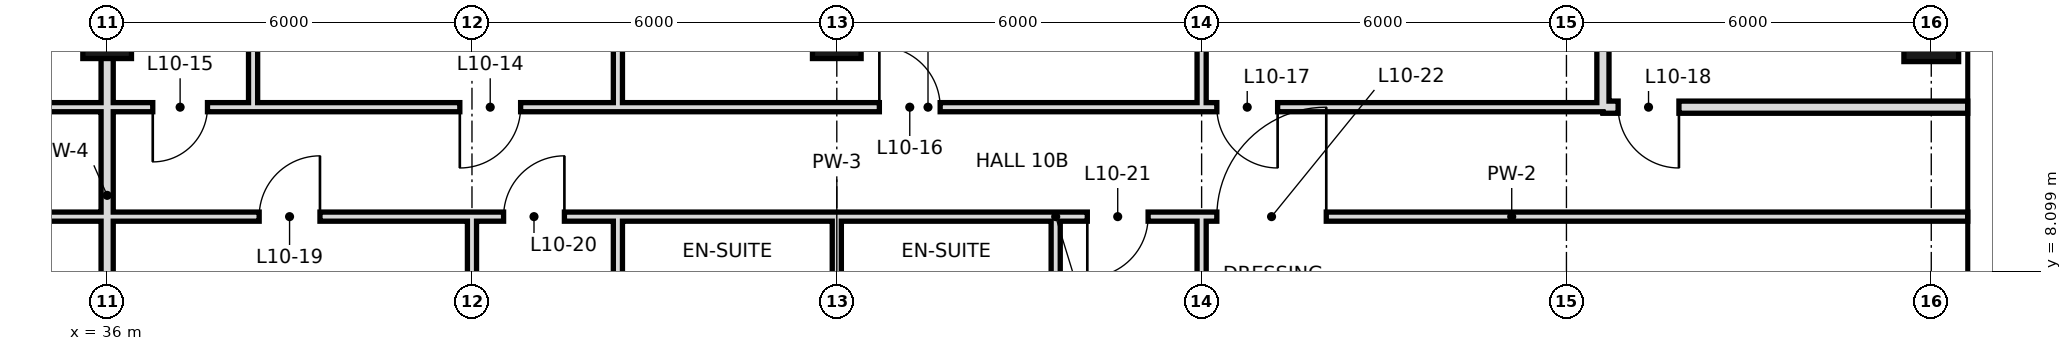
"""IFC4 building model, lengths in metres.
Left out: names, types, materials, properties, quantities, classifications, styles, units other than length and angle.
Written with IfcOpenShell. Run it as: python <this file> out.ifc"""

import sys

from ifc_helpers import new_model, si_unit, direction, frame, frame_2d, origin, origin_2d, place, context, subcontext, project, spatial, rectangle, hollow_rectangle, extrude, element, fill, save


model = new_model("IFC4")
c1 = context("Model", 3, precision=1e-05, world=origin(), true_north=direction((0.0, 1.0)))
c2 = subcontext(c1, "Body", "Model", "MODEL_VIEW")
j1 = project(units=[si_unit("LENGTHUNIT", "METRE"), si_unit("PLANEANGLEUNIT", "RADIAN")], contexts=[c1])
p1 = place(None, origin())
s1 = spatial("IfcSite", under=j1, at=p1, CompositionType="ELEMENT")
p2 = place(p1, origin())
s2 = spatial("IfcBuilding", under=s1, at=p2, CompositionType="ELEMENT")
p3 = place(p2, frame((0.0, 0.0, 57.0)))
s3 = spatial("IfcBuildingStorey", under=s2, at=p3, CompositionType="ELEMENT", Elevation=57.0)
for number, where, z_axis, x_axis in (
    (1, (36.0, 12.0, 0.0), (0.0, 0.0, 1.0), (1.0, 0.0, 0.0)),
    (2, (48.0, 12.0, 0.0), (0.0, 0.0, 1.0), (1.0, 0.0, 0.0)),
):
    element("IfcColumn", number, at=place(p3, frame(where, z_axis=z_axis, x_axis=x_axis)), inside=s3, PredefinedType="COLUMN", context=c2, shape_type="SweptSolid", body=[
        extrude(hollow_rectangle(XDim=0.8, YDim=0.8, WallThickness=0.04, at=origin_2d()), origin(), (0.0, 0.0, 1.0), 3.6),
    ])
p4 = place(p3, frame((66.0, 12.0, 0.0), z_axis=(0.0, 0.0, 1.0), x_axis=(1.0, 0.0, 0.0)))
e3 = element("IfcColumn", 3, at=p4, inside=s3, PredefinedType="COLUMN", context=c2, shape_type="SweptSolid", body=[
    extrude(hollow_rectangle(XDim=0.9, YDim=0.9, WallThickness=0.045, at=origin_2d()), origin(), (0.0, 0.0, 1.0), 3.6),
])
p5 = place(p3, frame((36.0, 0.0, 0.0), z_axis=(0.0, 0.0, 1.0), x_axis=(0.0, 1.0, 0.0)))
e4 = element("IfcWall", 4, at=p5, inside=s3, PredefinedType="SOLIDWALL", context=c2, shape_type="SweptSolid", body=[
    extrude(rectangle(XDim=18.7, YDim=0.2, at=frame_2d((9.35, 0.0))), origin(), (0.0, 0.0, 1.0), 2.72),
])
p6 = place(p3, frame((38.4, 10.8, 0.0), z_axis=(0.0, 0.0, 1.0), x_axis=(0.0, 1.0, 0.0)))
e5 = element("IfcWall", 5, at=p6, inside=s3, PredefinedType="PARTITIONING", context=c2, shape_type="SweptSolid", body=[
    extrude(rectangle(XDim=7.9, YDim=0.15, at=frame_2d((3.95, 0.0))), origin(), (0.0, 0.0, 1.0), 3.42),
])
p7 = place(p3, frame((42.0, -0.6, 0.0), z_axis=(0.0, 0.0, 1.0), x_axis=(0.0, 1.0, 0.0)))
e6 = element("IfcWall", 6, at=p7, inside=s3, PredefinedType="PARTITIONING", context=c2, shape_type="SweptSolid", body=[
    extrude(rectangle(XDim=9.6, YDim=0.15, at=frame_2d((4.8, 0.0))), origin(), (0.0, 0.0, 1.0), 2.72),
])
p8 = place(p3, frame((44.4, 10.8, 0.0), z_axis=(0.0, 0.0, 1.0), x_axis=(0.0, 1.0, 0.0)))
e7 = element("IfcWall", 7, at=p8, inside=s3, PredefinedType="PARTITIONING", context=c2, shape_type="SweptSolid", body=[
    extrude(rectangle(XDim=7.9, YDim=0.15, at=frame_2d((3.95, 0.0))), origin(), (0.0, 0.0, 1.0), 3.42),
])
p9 = place(p3, frame((44.4, 6.0, 0.0), z_axis=(0.0, 0.0, 1.0), x_axis=(0.0, 1.0, 0.0)))
e8 = element("IfcWall", 8, at=p9, inside=s3, PredefinedType="PARTITIONING", context=c2, shape_type="SweptSolid", body=[
    extrude(rectangle(XDim=3.0, YDim=0.15, at=frame_2d((1.5, 0.0))), origin(), (0.0, 0.0, 1.0), 3.42),
])
p10 = place(p3, frame((48.0, 6.0, 0.0), z_axis=(0.0, 0.0, 1.0), x_axis=(0.0, 1.0, 0.0)))
e9 = element("IfcWall", 9, at=p10, inside=s3, PredefinedType="PARTITIONING", context=c2, shape_type="SweptSolid", body=[
    extrude(rectangle(XDim=3.0, YDim=0.15, at=frame_2d((1.5, 0.0))), origin(), (0.0, 0.0, 1.0), 2.72),
])
p11 = place(p3, frame((51.6, 6.0, 0.0), z_axis=(0.0, 0.0, 1.0), x_axis=(0.0, 1.0, 0.0)))
e10 = element("IfcWall", 10, at=p11, inside=s3, PredefinedType="PARTITIONING", context=c2, shape_type="SweptSolid", body=[
    extrude(rectangle(XDim=3.0, YDim=0.15, at=frame_2d((1.5, 0.0))), origin(), (0.0, 0.0, 1.0), 3.42),
])
p12 = place(p3, frame((54.0, -0.6, 0.0), z_axis=(0.0, 0.0, 1.0), x_axis=(0.0, 1.0, 0.0)))
e11 = element("IfcWall", 11, at=p12, inside=s3, PredefinedType="PARTITIONING", context=c2, shape_type="SweptSolid", body=[
    extrude(rectangle(XDim=9.6, YDim=0.15, at=frame_2d((4.8, 0.0))), origin(), (0.0, 0.0, 1.0), 3.42),
])
p13 = place(p3, frame((54.0, 10.8, 0.0), z_axis=(0.0, 0.0, 1.0), x_axis=(0.0, 1.0, 0.0)))
e12 = element("IfcWall", 12, at=p13, inside=s3, PredefinedType="PARTITIONING", context=c2, shape_type="SweptSolid", body=[
    extrude(rectangle(XDim=7.2, YDim=0.15, at=frame_2d((3.6, 0.0))), origin(), (0.0, 0.0, 1.0), 3.42),
])
p14 = place(p3, frame((60.6, 10.8, 0.0), z_axis=(0.0, 0.0, 1.0), x_axis=(0.0, 1.0, 0.0)))
e13 = element("IfcWall", 13, at=p14, inside=s3, PredefinedType="SOLIDWALL", context=c2, shape_type="SweptSolid", body=[
    extrude(rectangle(XDim=7.2, YDim=0.2, at=frame_2d((3.6, 0.0))), origin(), (0.0, 0.0, 1.0), 2.52),
])
p15 = place(p3, frame((60.6, 10.8, 0.0), z_axis=(0.0, 0.0, 1.0), x_axis=(1.0, 0.0, 0.0)))
e14 = element("IfcWall", 14, at=p15, inside=s3, PredefinedType="SOLIDWALL", context=c2, shape_type="SweptSolid", body=[
    extrude(rectangle(XDim=6.0, YDim=0.2, at=frame_2d((3.0, 0.0))), origin(), (0.0, 0.0, 1.0), 2.97),
])
p16 = place(p15, frame((0.25, 0.0, 0.0)))
e15 = element("IfcOpeningElement", 15, at=p16, cuts=e14, PredefinedType="OPENING", context=c2, shape_type="SweptSolid", body=[
    extrude(rectangle(XDim=1.0, YDim=2.4, at=frame_2d((0.5, 1.2))), frame((0.0, 0.11, 0.0), z_axis=(0.0, -1.0, 0.0), x_axis=(1.0, 0.0, 0.0)), (0.0, 0.0, 1.0), 0.22),
])
p17 = place(p3, frame((6.6, 10.8, 0.0), z_axis=(0.0, 0.0, 1.0), x_axis=(1.0, 0.0, 0.0)))
e16 = element("IfcWall", 16, at=p17, inside=s3, PredefinedType="PARTITIONING", context=c2, shape_type="SweptSolid", body=[
    extrude(rectangle(XDim=29.4, YDim=0.15, at=frame_2d((14.7, 0.0))), origin(), (0.0, 0.0, 1.0), 3.42),
])
p18 = place(p17, frame((26.8, 0.0, 0.0)))
e17 = element("IfcOpeningElement", 17, at=p18, cuts=e16, PredefinedType="OPENING", context=c2, shape_type="SweptSolid", body=[
    extrude(rectangle(XDim=1.0, YDim=2.4, at=frame_2d((0.5, 1.2))), frame((0.0, 0.085, 0.0), z_axis=(0.0, -1.0, 0.0), x_axis=(1.0, 0.0, 0.0)), (0.0, 0.0, 1.0), 0.17),
])
p19 = place(p17, frame((3.22, 0.0, 0.0)))
e18 = element("IfcOpeningElement", 18, at=p19, cuts=e16, PredefinedType="OPENING", context=c2, shape_type="SweptSolid", body=[
    extrude(rectangle(XDim=1.0, YDim=2.4, at=frame_2d((0.5, 1.2))), frame((0.0, 0.085, 0.0), z_axis=(0.0, -1.0, 0.0), x_axis=(1.0, 0.0, 0.0)), (0.0, 0.0, 1.0), 0.17),
])
p20 = place(p17, frame((14.8, 0.0, 0.0)))
e19 = element("IfcOpeningElement", 19, at=p20, cuts=e16, PredefinedType="OPENING", context=c2, shape_type="SweptSolid", body=[
    extrude(rectangle(XDim=1.0, YDim=2.4, at=frame_2d((0.5, 1.2))), frame((0.0, 0.085, 0.0), z_axis=(0.0, -1.0, 0.0), x_axis=(1.0, 0.0, 0.0)), (0.0, 0.0, 1.0), 0.17),
])
p21 = place(p3, frame((38.4, 10.8, 0.0), z_axis=(0.0, 0.0, 1.0), x_axis=(1.0, 0.0, 0.0)))
e20 = element("IfcWall", 20, at=p21, inside=s3, PredefinedType="PARTITIONING", context=c2, shape_type="SweptSolid", body=[
    extrude(rectangle(XDim=22.2, YDim=0.15, at=frame_2d((11.1, 0.0))), origin(), (0.0, 0.0, 1.0), 3.42),
])
p22 = place(p21, frame((3.4, 0.0, 0.0)))
e21 = element("IfcOpeningElement", 21, at=p22, cuts=e20, PredefinedType="OPENING", context=c2, shape_type="SweptSolid", body=[
    extrude(rectangle(XDim=1.0, YDim=2.4, at=frame_2d((0.5, 1.2))), frame((0.0, 0.085, 0.0), z_axis=(0.0, -1.0, 0.0), x_axis=(1.0, 0.0, 0.0)), (0.0, 0.0, 1.0), 0.17),
])
p23 = place(p21, frame((10.3, 0.0, 0.0)))
e22 = element("IfcOpeningElement", 22, at=p23, cuts=e20, PredefinedType="OPENING", context=c2, shape_type="SweptSolid", body=[
    extrude(rectangle(XDim=1.0, YDim=2.4, at=frame_2d((0.5, 1.2))), frame((0.0, 0.085, 0.0), z_axis=(0.0, -1.0, 0.0), x_axis=(1.0, 0.0, 0.0)), (0.0, 0.0, 1.0), 0.17),
])
p24 = place(p21, frame((15.85, 0.0, 0.0)))
e23 = element("IfcOpeningElement", 23, at=p24, cuts=e20, PredefinedType="OPENING", context=c2, shape_type="SweptSolid", body=[
    extrude(rectangle(XDim=1.0, YDim=2.4, at=frame_2d((0.5, 1.2))), frame((0.0, 0.085, 0.0), z_axis=(0.0, -1.0, 0.0), x_axis=(1.0, 0.0, 0.0)), (0.0, 0.0, 1.0), 0.17),
])
p25 = place(p3, frame((36.0, 10.8, 0.0), z_axis=(0.0, 0.0, 1.0), x_axis=(1.0, 0.0, 0.0)))
e24 = element("IfcWall", 24, at=p25, inside=s3, PredefinedType="PARTITIONING", context=c2, shape_type="SweptSolid", body=[
    extrude(rectangle(XDim=2.4, YDim=0.15, at=frame_2d((1.2, 0.0))), origin(), (0.0, 0.0, 1.0), 3.42),
])
p26 = place(p25, frame((0.75, 0.0, 0.0)))
e25 = element("IfcOpeningElement", 25, at=p26, cuts=e24, PredefinedType="OPENING", context=c2, shape_type="SweptSolid", body=[
    extrude(rectangle(XDim=0.9, YDim=2.4, at=frame_2d((0.45, 1.2))), frame((0.0, 0.085, 0.0), z_axis=(0.0, -1.0, 0.0), x_axis=(1.0, 0.0, 0.0)), (0.0, 0.0, 1.0), 0.17),
])
p27 = place(p3, frame((8.4, 9.0, 0.0), z_axis=(0.0, 0.0, 1.0), x_axis=(1.0, 0.0, 0.0)))
e26 = element("IfcWall", 26, at=p27, inside=s3, PredefinedType="PARTITIONING", context=c2, shape_type="SweptSolid", body=[
    extrude(rectangle(XDim=36.0, YDim=0.15, at=frame_2d((18.0, 0.0))), origin(), (0.0, 0.0, 1.0), 3.42),
])
p28 = place(p27, frame((0.88, 0.0, 0.0)))
e27 = element("IfcOpeningElement", 27, at=p28, cuts=e26, PredefinedType="OPENING", context=c2, shape_type="SweptSolid", body=[
    extrude(rectangle(XDim=1.0, YDim=2.4, at=frame_2d((0.5, 1.2))), frame((0.0, 0.085, 0.0), z_axis=(0.0, -1.0, 0.0), x_axis=(1.0, 0.0, 0.0)), (0.0, 0.0, 1.0), 0.17),
])
p29 = place(p27, frame((6.1, 0.0, 0.0)))
e28 = element("IfcOpeningElement", 28, at=p29, cuts=e26, PredefinedType="OPENING", context=c2, shape_type="SweptSolid", body=[
    extrude(rectangle(XDim=1.0, YDim=2.4, at=frame_2d((0.5, 1.2))), frame((0.0, 0.085, 0.0), z_axis=(0.0, -1.0, 0.0), x_axis=(1.0, 0.0, 0.0)), (0.0, 0.0, 1.0), 0.17),
])
p30 = place(p27, frame((16.64, 0.0, 0.0)))
e29 = element("IfcOpeningElement", 29, at=p30, cuts=e26, PredefinedType="OPENING", context=c2, shape_type="SweptSolid", body=[
    extrude(rectangle(XDim=1.8, YDim=2.4, at=frame_2d((0.9, 1.2))), frame((0.0, 0.085, 0.0), z_axis=(0.0, -1.0, 0.0), x_axis=(1.0, 0.0, 0.0)), (0.0, 0.0, 1.0), 0.17),
])
p31 = place(p27, frame((23.7, 0.0, 0.0)))
e30 = element("IfcOpeningElement", 30, at=p31, cuts=e26, PredefinedType="OPENING", context=c2, shape_type="SweptSolid", body=[
    extrude(rectangle(XDim=1.8, YDim=2.4, at=frame_2d((0.9, 1.2))), frame((0.0, 0.085, 0.0), z_axis=(0.0, -1.0, 0.0), x_axis=(1.0, 0.0, 0.0)), (0.0, 0.0, 1.0), 0.17),
])
p32 = place(p27, frame((30.1, 0.0, 0.0)))
e31 = element("IfcOpeningElement", 31, at=p32, cuts=e26, PredefinedType="OPENING", context=c2, shape_type="SweptSolid", body=[
    extrude(rectangle(XDim=1.0, YDim=2.4, at=frame_2d((0.5, 1.2))), frame((0.0, 0.085, 0.0), z_axis=(0.0, -1.0, 0.0), x_axis=(1.0, 0.0, 0.0)), (0.0, 0.0, 1.0), 0.17),
])
p33 = place(p27, frame((34.12, 0.0, 0.0)))
e32 = element("IfcOpeningElement", 32, at=p33, cuts=e26, PredefinedType="OPENING", context=c2, shape_type="SweptSolid", body=[
    extrude(rectangle(XDim=1.0, YDim=2.4, at=frame_2d((0.5, 1.2))), frame((0.0, 0.085, 0.0), z_axis=(0.0, -1.0, 0.0), x_axis=(1.0, 0.0, 0.0)), (0.0, 0.0, 1.0), 0.17),
])
p34 = place(p3, frame((51.6, 9.0, 0.0), z_axis=(0.0, 0.0, 1.0), x_axis=(1.0, 0.0, 0.0)))
e33 = element("IfcWall", 33, at=p34, inside=s3, PredefinedType="PARTITIONING", context=c2, shape_type="SweptSolid", body=[
    extrude(rectangle(XDim=15.0, YDim=0.15, at=frame_2d((7.5, 0.0))), origin(), (0.0, 0.0, 1.0), 3.42),
])
p35 = place(p34, frame((0.52, 0.0, 0.0)))
e34 = element("IfcOpeningElement", 34, at=p35, cuts=e33, PredefinedType="OPENING", context=c2, shape_type="SweptSolid", body=[
    extrude(rectangle(XDim=1.0, YDim=2.4, at=frame_2d((0.5, 1.2))), frame((0.0, 0.085, 0.0), z_axis=(0.0, -1.0, 0.0), x_axis=(1.0, 0.0, 0.0)), (0.0, 0.0, 1.0), 0.17),
])
p36 = place(p34, frame((2.65, 0.0, 0.0)))
e35 = element("IfcOpeningElement", 35, at=p36, cuts=e33, PredefinedType="OPENING", context=c2, shape_type="SweptSolid", body=[
    extrude(rectangle(XDim=1.8, YDim=2.4, at=frame_2d((0.9, 1.2))), frame((0.0, 0.085, 0.0), z_axis=(0.0, -1.0, 0.0), x_axis=(1.0, 0.0, 0.0)), (0.0, 0.0, 1.0), 0.17),
])
p37 = place(p3, frame((44.4, 9.0, 0.0), z_axis=(0.0, 0.0, 1.0), x_axis=(1.0, 0.0, 0.0)))
e36 = element("IfcWall", 36, at=p37, inside=s3, PredefinedType="PARTITIONING", context=c2, shape_type="SweptSolid", body=[
    extrude(rectangle(XDim=7.2, YDim=0.15, at=frame_2d((3.6, 0.0))), origin(), (0.0, 0.0, 1.0), 3.42),
])
p38 = place(p22, frame((1.0, 0.0, 0.0), z_axis=(0.0, 0.0, 1.0), x_axis=(-1.0, 0.0, 0.0)))
e37 = element("IfcDoor", 37, at=p38, inside=s3, OperationType="SINGLE_SWING_RIGHT", PredefinedType="DOOR", context=c2, shape_type="SweptSolid", body=[
    extrude(rectangle(XDim=1.0, YDim=2.4, at=frame_2d((0.5, 1.2))), frame((0.0, 0.025, 0.0), z_axis=(0.0, -1.0, 0.0), x_axis=(1.0, 0.0, 0.0)), (0.0, 0.0, 1.0), 0.05),
])
fill(e21, e37)
p39 = place(p26, frame((0.9, 0.0, 0.0), z_axis=(0.0, 0.0, 1.0), x_axis=(-1.0, 0.0, 0.0)))
e38 = element("IfcDoor", 38, at=p39, inside=s3, OperationType="SINGLE_SWING_RIGHT", PredefinedType="DOOR", context=c2, shape_type="SweptSolid", body=[
    extrude(rectangle(XDim=0.9, YDim=2.4, at=frame_2d((0.45, 1.2))), frame((0.0, 0.025, 0.0), z_axis=(0.0, -1.0, 0.0), x_axis=(1.0, 0.0, 0.0)), (0.0, 0.0, 1.0), 0.05),
])
fill(e25, e38)
p40 = place(p23, origin())
e39 = element("IfcDoor", 39, at=p40, inside=s3, OperationType="SINGLE_SWING_LEFT", PredefinedType="DOOR", context=c2, shape_type="SweptSolid", body=[
    extrude(rectangle(XDim=1.0, YDim=2.4, at=frame_2d((0.5, 1.2))), frame((0.0, 0.025, 0.0), z_axis=(0.0, -1.0, 0.0), x_axis=(1.0, 0.0, 0.0)), (0.0, 0.0, 1.0), 0.05),
])
fill(e22, e39)
p41 = place(p24, origin())
e40 = element("IfcDoor", 40, at=p41, inside=s3, OperationType="SINGLE_SWING_RIGHT", PredefinedType="DOOR", context=c2, shape_type="SweptSolid", body=[
    extrude(rectangle(XDim=1.0, YDim=2.4, at=frame_2d((0.5, 1.2))), frame((0.0, 0.025, 0.0), z_axis=(0.0, -1.0, 0.0), x_axis=(1.0, 0.0, 0.0)), (0.0, 0.0, 1.0), 0.05),
])
fill(e23, e40)
p42 = place(p16, origin())
e41 = element("IfcDoor", 41, at=p42, inside=s3, OperationType="SINGLE_SWING_RIGHT", PredefinedType="DOOR", context=c2, shape_type="SweptSolid", body=[
    extrude(rectangle(XDim=1.0, YDim=2.4, at=frame_2d((0.5, 1.2))), frame((0.0, 0.025, 0.0), z_axis=(0.0, -1.0, 0.0), x_axis=(1.0, 0.0, 0.0)), (0.0, 0.0, 1.0), 0.05),
])
fill(e15, e41)
p43 = place(p32, frame((1.0, 0.0, 0.0), z_axis=(0.0, 0.0, 1.0), x_axis=(-1.0, 0.0, 0.0)))
e42 = element("IfcDoor", 42, at=p43, inside=s3, OperationType="SINGLE_SWING_LEFT", PredefinedType="DOOR", context=c2, shape_type="SweptSolid", body=[
    extrude(rectangle(XDim=1.0, YDim=2.4, at=frame_2d((0.5, 1.2))), frame((0.0, 0.025, 0.0), z_axis=(0.0, -1.0, 0.0), x_axis=(1.0, 0.0, 0.0)), (0.0, 0.0, 1.0), 0.05),
])
fill(e31, e42)
p44 = place(p33, frame((1.0, 0.0, 0.0), z_axis=(0.0, 0.0, 1.0), x_axis=(-1.0, 0.0, 0.0)))
e43 = element("IfcDoor", 43, at=p44, inside=s3, OperationType="SINGLE_SWING_LEFT", PredefinedType="DOOR", context=c2, shape_type="SweptSolid", body=[
    extrude(rectangle(XDim=1.0, YDim=2.4, at=frame_2d((0.5, 1.2))), frame((0.0, 0.025, 0.0), z_axis=(0.0, -1.0, 0.0), x_axis=(1.0, 0.0, 0.0)), (0.0, 0.0, 1.0), 0.05),
])
fill(e32, e43)
p45 = place(p35, frame((1.0, 0.0, 0.0), z_axis=(0.0, 0.0, 1.0), x_axis=(-1.0, 0.0, 0.0)))
e44 = element("IfcDoor", 44, at=p45, inside=s3, OperationType="SINGLE_SWING_RIGHT", PredefinedType="DOOR", context=c2, shape_type="SweptSolid", body=[
    extrude(rectangle(XDim=1.0, YDim=2.4, at=frame_2d((0.5, 1.2))), frame((0.0, 0.025, 0.0), z_axis=(0.0, -1.0, 0.0), x_axis=(1.0, 0.0, 0.0)), (0.0, 0.0, 1.0), 0.05),
])
fill(e34, e44)
p46 = place(p36, frame((1.8, 0.0, 0.0), z_axis=(0.0, 0.0, 1.0), x_axis=(-1.0, 0.0, 0.0)))
e45 = element("IfcDoor", 45, at=p46, inside=s3, OperationType="SINGLE_SWING_LEFT", PredefinedType="DOOR", context=c2, shape_type="SweptSolid", body=[
    extrude(rectangle(XDim=1.8, YDim=2.4, at=frame_2d((0.9, 1.2))), frame((0.0, 0.025, 0.0), z_axis=(0.0, -1.0, 0.0), x_axis=(1.0, 0.0, 0.0)), (0.0, 0.0, 1.0), 0.05),
])
fill(e35, e45)
save(model, sys.argv[1])
